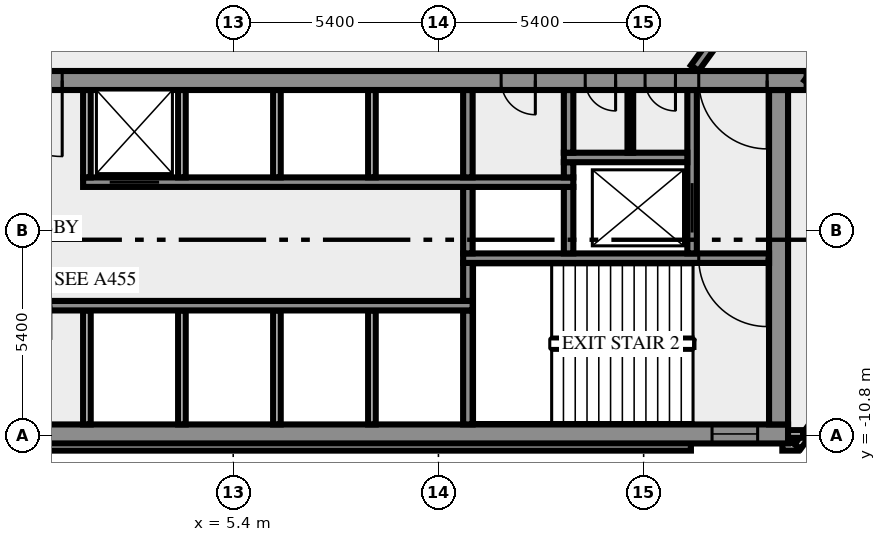
"""IFC4 building model, lengths in metres.
Left out: names, types, materials, properties, quantities, classifications, styles, units other than length and angle.
Written with IfcOpenShell. Run it as: python <this file> out.ifc"""

import sys

from ifc_helpers import new_model, si_unit, direction, frame, frame_2d, origin, place, context, subcontext, project, spatial, rectangle, extrude, element, fill, save


model = new_model("IFC4")
c1 = context("Model", 3, precision=1e-05, world=origin(), true_north=direction((0.0, 1.0)))
c2 = subcontext(c1, "Body", "Model", "MODEL_VIEW")
j1 = project(units=[si_unit("LENGTHUNIT", "METRE"), si_unit("PLANEANGLEUNIT", "RADIAN")], contexts=[c1])
p1 = place(None, origin())
s1 = spatial("IfcSite", under=j1, at=p1, CompositionType="ELEMENT")
p2 = place(p1, origin())
s2 = spatial("IfcBuilding", under=s1, at=p2, CompositionType="ELEMENT")
p3 = place(p2, frame((0.0, 0.0, 47.0)))
s3 = spatial("IfcBuildingStorey", under=s2, at=p3, CompositionType="ELEMENT", Elevation=47.0)
p4 = place(p3, frame((-17.444, -11.088, 0.0), z_axis=(0.0, 0.0, 1.0), x_axis=(1.0, 0.0, 0.0)))
e1 = element("IfcWall", 1, at=p4, inside=s3, PredefinedType="SOLIDWALL", context=c2, shape_type="SweptSolid", body=[
    extrude(rectangle(XDim=34.888, YDim=0.2, at=frame_2d((17.444, 0.0))), origin(), (0.0, 0.0, 1.0), 3.65),
])
p5 = place(p3, frame((19.85, -11.088, 0.0), z_axis=(0.0, 0.0, 1.0), x_axis=(1.0, 0.0, 0.0)))
e2 = element("IfcWall", 2, at=p5, inside=s3, PredefinedType="SOLIDWALL", context=c2, shape_type="SweptSolid", body=[
    extrude(rectangle(XDim=0.406, YDim=0.2, at=frame_2d((0.203, 0.0))), origin(), (0.0, 0.0, 1.0), 3.65),
])
p6 = place(p3, frame((20.253, -11.083, 0.0), z_axis=(0.0, 0.0, 1.0), x_axis=(0.587766567315, 0.809030569476, 0.0)))
e3 = element("IfcWall", 3, at=p6, inside=s3, PredefinedType="SOLIDWALL", context=c2, shape_type="SweptSolid", body=[
    extrude(rectangle(XDim=2.688, YDim=0.2, at=frame_2d((1.344, 0.0))), origin(), (0.0, 0.0, 1.0), 3.65),
])
p7 = place(p3, frame((19.98, -10.75, 0.0), z_axis=(0.0, 0.0, 1.0), x_axis=(1.0, 0.0, 0.0)))
e4 = element("IfcWall", 4, at=p7, inside=s3, PredefinedType="SOLIDWALL", context=c2, shape_type="SweptSolid", body=[
    extrude(rectangle(XDim=0.417, YDim=0.2, at=frame_2d((0.208, 0.0))), origin(), (0.0, 0.0, 1.0), 3.65),
])
p8 = place(p3, frame((-20.0, -10.75, 0.0), z_axis=(0.0, 0.0, 1.0), x_axis=(1.0, 0.0, 0.0)))
e5 = element("IfcWall", 5, at=p8, inside=s3, PredefinedType="SHEAR", context=c2, shape_type="SweptSolid", body=[
    extrude(rectangle(XDim=40.0, YDim=0.5, at=frame_2d((20.0, 0.0))), origin(), (0.0, 0.0, 1.0), 3.65),
])
p9 = place(p8, frame((0.8, 0.0, 1.0)))
e6 = element("IfcOpeningElement", 6, at=p9, cuts=e5, PredefinedType="OPENING", context=c2, shape_type="SweptSolid", body=[
    extrude(rectangle(XDim=1.2, YDim=1.2, at=frame_2d((0.6, 0.6))), frame((0.0, 0.26, 0.0), z_axis=(0.0, -1.0, 0.0), x_axis=(1.0, 0.0, 0.0)), (0.0, 0.0, 1.0), 0.52),
])
p10 = place(p8, frame((38.0, 0.0, 1.0)))
e7 = element("IfcOpeningElement", 7, at=p10, cuts=e5, PredefinedType="OPENING", context=c2, shape_type="SweptSolid", body=[
    extrude(rectangle(XDim=1.2, YDim=1.2, at=frame_2d((0.6, 0.6))), frame((0.0, 0.26, 0.0), z_axis=(0.0, -1.0, 0.0), x_axis=(1.0, 0.0, 0.0)), (0.0, 0.0, 1.0), 0.52),
])
for number, where, z_axis, x_axis in (
    (8, (1.55, -10.5, 0.0), (0.0, 0.0, 1.0), (0.0, 1.0, 0.0)),
    (9, (4.05, -10.5, 0.0), (0.0, 0.0, 1.0), (0.0, 1.0, 0.0)),
    (10, (6.55, -10.5, 0.0), (0.0, 0.0, 1.0), (0.0, 1.0, 0.0)),
    (11, (9.05, -10.5, 0.0), (0.0, 0.0, 1.0), (0.0, 1.0, 0.0)),
):
    element("IfcWall", number, at=place(p3, frame(where, z_axis=z_axis, x_axis=x_axis)), inside=s3, PredefinedType="SOLIDWALL", context=c2, shape_type="SweptSolid", body=[
        extrude(rectangle(XDim=3.0, YDim=0.2, at=frame_2d((1.5, 0.0))), origin(), (0.0, 0.0, 1.0), 3.65),
    ])
p11 = place(p3, frame((11.575, -10.5, 0.0), z_axis=(0.0, 0.0, 1.0), x_axis=(0.0, 1.0, 0.0)))
e12 = element("IfcWall", 12, at=p11, inside=s3, PredefinedType="SHEAR", context=c2, shape_type="SweptSolid", body=[
    extrude(rectangle(XDim=3.0, YDim=0.25, at=frame_2d((1.5, 0.0))), origin(), (0.0, 0.0, 1.0), 3.65),
])
p12 = place(p3, frame((19.75, -10.5, 0.0), z_axis=(0.0, 0.0, 1.0), x_axis=(0.0, 1.0, 0.0)))
e13 = element("IfcWall", 13, at=p12, inside=s3, PredefinedType="SHEAR", context=c2, shape_type="SweptSolid", body=[
    extrude(rectangle(XDim=8.8, YDim=0.5, at=frame_2d((4.4, 0.0))), origin(), (0.0, 0.0, 1.0), 3.65),
])
p13 = place(p3, frame((11.7, -7.375, 0.0), z_axis=(0.0, 0.0, 1.0), x_axis=(-1.0, 0.0, 0.0)))
e14 = element("IfcWall", 14, at=p13, inside=s3, PredefinedType="SHEAR", context=c2, shape_type="SweptSolid", body=[
    extrude(rectangle(XDim=23.4, YDim=0.25, at=frame_2d((11.7, 0.0))), origin(), (0.0, 0.0, 1.0), 3.65),
])
p14 = place(p13, frame((21.45, 0.0, 0.0)))
e15 = element("IfcOpeningElement", 15, at=p14, cuts=e14, PredefinedType="OPENING", context=c2, shape_type="SweptSolid", body=[
    extrude(rectangle(XDim=1.1, YDim=2.1, at=frame_2d((0.55, 1.05))), frame((0.0, 0.135, 0.0), z_axis=(0.0, -1.0, 0.0), x_axis=(1.0, 0.0, 0.0)), (0.0, 0.0, 1.0), 0.27),
])
p15 = place(p13, frame((18.95, 0.0, 0.0)))
e16 = element("IfcOpeningElement", 16, at=p15, cuts=e14, PredefinedType="OPENING", context=c2, shape_type="SweptSolid", body=[
    extrude(rectangle(XDim=1.1, YDim=2.1, at=frame_2d((0.55, 1.05))), frame((0.0, 0.135, 0.0), z_axis=(0.0, -1.0, 0.0), x_axis=(1.0, 0.0, 0.0)), (0.0, 0.0, 1.0), 0.27),
])
p16 = place(p13, frame((16.45, 0.0, 0.0)))
e17 = element("IfcOpeningElement", 17, at=p16, cuts=e14, PredefinedType="OPENING", context=c2, shape_type="SweptSolid", body=[
    extrude(rectangle(XDim=1.1, YDim=2.1, at=frame_2d((0.55, 1.05))), frame((0.0, 0.135, 0.0), z_axis=(0.0, -1.0, 0.0), x_axis=(1.0, 0.0, 0.0)), (0.0, 0.0, 1.0), 0.27),
])
p17 = place(p13, frame((13.875, 0.0, 0.0)))
e18 = element("IfcOpeningElement", 18, at=p17, cuts=e14, PredefinedType="OPENING", context=c2, shape_type="SweptSolid", body=[
    extrude(rectangle(XDim=0.9, YDim=2.1, at=frame_2d((0.45, 1.05))), frame((0.0, 0.135, 0.0), z_axis=(0.0, -1.0, 0.0), x_axis=(1.0, 0.0, 0.0)), (0.0, 0.0, 1.0), 0.27),
])
p18 = place(p13, frame((11.1, 0.0, 0.0)))
e19 = element("IfcOpeningElement", 19, at=p18, cuts=e14, PredefinedType="OPENING", context=c2, shape_type="SweptSolid", body=[
    extrude(rectangle(XDim=0.9, YDim=2.1, at=frame_2d((0.45, 1.05))), frame((0.0, 0.135, 0.0), z_axis=(0.0, -1.0, 0.0), x_axis=(1.0, 0.0, 0.0)), (0.0, 0.0, 1.0), 0.27),
])
p19 = place(p3, frame((11.575, -7.25, 0.0), z_axis=(0.0, 0.0, 1.0), x_axis=(0.0, 1.0, 0.0)))
e20 = element("IfcWall", 20, at=p19, inside=s3, PredefinedType="SHEAR", context=c2, shape_type="SweptSolid", body=[
    extrude(rectangle(XDim=1.0, YDim=0.25, at=frame_2d((0.5, 0.0))), origin(), (0.0, 0.0, 1.0), 3.65),
])
p20 = place(p3, frame((19.5, -6.125, 0.0), z_axis=(0.0, 0.0, 1.0), x_axis=(-1.0, 0.0, 0.0)))
e21 = element("IfcWall", 21, at=p20, inside=s3, PredefinedType="SHEAR", context=c2, shape_type="SweptSolid", body=[
    extrude(rectangle(XDim=8.05, YDim=0.25, at=frame_2d((4.025, 0.0))), origin(), (0.0, 0.0, 1.0), 3.65),
])
p21 = place(p20, frame((0.05, 0.0, 0.0)))
e22 = element("IfcOpeningElement", 22, at=p21, cuts=e21, PredefinedType="OPENING", context=c2, shape_type="SweptSolid", body=[
    extrude(rectangle(XDim=1.8, YDim=2.1, at=frame_2d((0.9, 1.05))), frame((0.0, 0.135, 0.0), z_axis=(0.0, -1.0, 0.0), x_axis=(1.0, 0.0, 0.0)), (0.0, 0.0, 1.0), 0.27),
])
for number, where, z_axis, x_axis in (
    (23, (11.575, -6.0, 0.0), (0.0, 0.0, 1.0), (0.0, 1.0, 0.0)),
    (24, (14.225, -6.0, 0.0), (0.0, 0.0, 1.0), (0.0, 1.0, 0.0)),
):
    element("IfcWall", number, at=place(p3, frame(where, z_axis=z_axis, x_axis=x_axis)), inside=s3, PredefinedType="SHEAR", context=c2, shape_type="SweptSolid", body=[
        extrude(rectangle(XDim=1.75, YDim=0.25, at=frame_2d((0.875, 0.0))), origin(), (0.0, 0.0, 1.0), 3.65),
    ])
p22 = place(p3, frame((17.475, -6.0, 0.0), z_axis=(0.0, 0.0, 1.0), x_axis=(0.0, 1.0, 0.0)))
e25 = element("IfcWall", 25, at=p22, inside=s3, PredefinedType="SHEAR", context=c2, shape_type="SweptSolid", body=[
    extrude(rectangle(XDim=4.3, YDim=0.25, at=frame_2d((2.15, 0.0))), origin(), (0.0, 0.0, 1.0), 3.65),
])
p23 = place(p22, frame((0.55, 0.0, 0.0)))
e26 = element("IfcOpeningElement", 26, at=p23, cuts=e25, PredefinedType="OPENING", context=c2, shape_type="SweptSolid", body=[
    extrude(rectangle(XDim=1.3, YDim=2.1, at=frame_2d((0.65, 1.05))), frame((0.0, 0.135, 0.0), z_axis=(0.0, -1.0, 0.0), x_axis=(1.0, 0.0, 0.0)), (0.0, 0.0, 1.0), 0.27),
])
p24 = place(p3, frame((1.45, -4.125, 0.0), z_axis=(0.0, 0.0, 1.0), x_axis=(1.0, 0.0, 0.0)))
e27 = element("IfcWall", 27, at=p24, inside=s3, PredefinedType="SHEAR", context=c2, shape_type="SweptSolid", body=[
    extrude(rectangle(XDim=12.9, YDim=0.25, at=frame_2d((6.45, 0.0))), origin(), (0.0, 0.0, 1.0), 3.65),
])
p25 = place(p24, frame((0.7, 0.0, 0.0)))
e28 = element("IfcOpeningElement", 28, at=p25, cuts=e27, PredefinedType="OPENING", context=c2, shape_type="SweptSolid", body=[
    extrude(rectangle(XDim=1.3, YDim=2.1, at=frame_2d((0.65, 1.05))), frame((0.0, 0.135, 0.0), z_axis=(0.0, -1.0, 0.0), x_axis=(1.0, 0.0, 0.0)), (0.0, 0.0, 1.0), 0.27),
])
for number, where, z_axis, x_axis in (
    (29, (1.55, -4.0, 0.0), (0.0, 0.0, 1.0), (0.0, 1.0, 0.0)),
    (30, (4.05, -4.0, 0.0), (0.0, 0.0, 1.0), (0.0, 1.0, 0.0)),
    (31, (6.55, -4.0, 0.0), (0.0, 0.0, 1.0), (0.0, 1.0, 0.0)),
    (32, (9.05, -4.0, 0.0), (0.0, 0.0, 1.0), (0.0, 1.0, 0.0)),
):
    element("IfcWall", number, at=place(p3, frame(where, z_axis=z_axis, x_axis=x_axis)), inside=s3, PredefinedType="SOLIDWALL", context=c2, shape_type="SweptSolid", body=[
        extrude(rectangle(XDim=2.3, YDim=0.2, at=frame_2d((1.15, 0.0))), origin(), (0.0, 0.0, 1.0), 3.65),
    ])
p26 = place(p3, frame((11.575, -4.0, 0.0), z_axis=(0.0, 0.0, 1.0), x_axis=(0.0, 1.0, 0.0)))
e33 = element("IfcWall", 33, at=p26, inside=s3, PredefinedType="SHEAR", context=c2, shape_type="SweptSolid", body=[
    extrude(rectangle(XDim=2.3, YDim=0.25, at=frame_2d((1.15, 0.0))), origin(), (0.0, 0.0, 1.0), 3.65),
])
p27 = place(p3, frame((14.225, -4.0, 0.0), z_axis=(0.0, 0.0, 1.0), x_axis=(0.0, 1.0, 0.0)))
e34 = element("IfcWall", 34, at=p27, inside=s3, PredefinedType="SHEAR", context=c2, shape_type="SweptSolid", body=[
    extrude(rectangle(XDim=0.4, YDim=0.25, at=frame_2d((0.2, 0.0))), origin(), (0.0, 0.0, 1.0), 3.65),
])
p28 = place(p3, frame((14.1, -3.475, 0.0), z_axis=(0.0, 0.0, 1.0), x_axis=(1.0, 0.0, 0.0)))
e35 = element("IfcWall", 35, at=p28, inside=s3, PredefinedType="SHEAR", context=c2, shape_type="SweptSolid", body=[
    extrude(rectangle(XDim=3.25, YDim=0.25, at=frame_2d((1.625, 0.0))), origin(), (0.0, 0.0, 1.0), 3.65),
])
p29 = place(p3, frame((14.225, -3.35, 0.0), z_axis=(0.0, 0.0, 1.0), x_axis=(0.0, 1.0, 0.0)))
e36 = element("IfcWall", 36, at=p29, inside=s3, PredefinedType="SHEAR", context=c2, shape_type="SweptSolid", body=[
    extrude(rectangle(XDim=1.65, YDim=0.25, at=frame_2d((0.825, 0.0))), origin(), (0.0, 0.0, 1.0), 3.65),
])
p30 = place(p3, frame((15.85, -3.35, 0.0), z_axis=(0.0, 0.0, 1.0), x_axis=(0.0, 1.0, 0.0)))
e37 = element("IfcWall", 37, at=p30, inside=s3, PredefinedType="PARTITIONING", context=c2, shape_type="SweptSolid", body=[
    extrude(rectangle(XDim=1.65, YDim=0.15, at=frame_2d((0.825, 0.0))), origin(), (0.0, 0.0, 1.0), 3.65),
])
p31 = place(p3, frame((20.49, -1.45, 0.0), z_axis=(0.0, 0.0, 1.0), x_axis=(-1.0, 0.0, 0.0)))
e38 = element("IfcWall", 38, at=p31, inside=s3, PredefinedType="SHEAR", context=c2, shape_type="SweptSolid", body=[
    extrude(rectangle(XDim=40.98, YDim=0.5, at=frame_2d((20.49, 0.0))), origin(), (0.0, 0.0, 1.0), 3.65),
])
p32 = place(p31, frame((38.14, 0.0, 0.0)))
e39 = element("IfcOpeningElement", 39, at=p32, cuts=e38, PredefinedType="OPENING", context=c2, shape_type="SweptSolid", body=[
    extrude(rectangle(XDim=1.8, YDim=2.1, at=frame_2d((0.9, 1.05))), frame((0.0, 0.26, 0.0), z_axis=(0.0, -1.0, 0.0), x_axis=(1.0, 0.0, 0.0)), (0.0, 0.0, 1.0), 0.52),
])
p33 = place(p31, frame((35.89, 0.0, 0.0)))
e40 = element("IfcOpeningElement", 40, at=p33, cuts=e38, PredefinedType="OPENING", context=c2, shape_type="SweptSolid", body=[
    extrude(rectangle(XDim=0.9, YDim=2.1, at=frame_2d((0.45, 1.05))), frame((0.0, 0.26, 0.0), z_axis=(0.0, -1.0, 0.0), x_axis=(1.0, 0.0, 0.0)), (0.0, 0.0, 1.0), 0.52),
])
p34 = place(p31, frame((32.94, 0.0, 0.0)))
e41 = element("IfcOpeningElement", 41, at=p34, cuts=e38, PredefinedType="OPENING", context=c2, shape_type="SweptSolid", body=[
    extrude(rectangle(XDim=0.9, YDim=2.1, at=frame_2d((0.45, 1.05))), frame((0.0, 0.26, 0.0), z_axis=(0.0, -1.0, 0.0), x_axis=(1.0, 0.0, 0.0)), (0.0, 0.0, 1.0), 0.52),
])
p35 = place(p31, frame((19.59, 0.0, 0.0)))
e42 = element("IfcOpeningElement", 42, at=p35, cuts=e38, PredefinedType="OPENING", context=c2, shape_type="SweptSolid", body=[
    extrude(rectangle(XDim=2.0, YDim=2.1, at=frame_2d((1.0, 1.05))), frame((0.0, 0.26, 0.0), z_axis=(0.0, -1.0, 0.0), x_axis=(1.0, 0.0, 0.0)), (0.0, 0.0, 1.0), 0.52),
])
p36 = place(p31, frame((7.14, 0.0, 0.0)))
e43 = element("IfcOpeningElement", 43, at=p36, cuts=e38, PredefinedType="OPENING", context=c2, shape_type="SweptSolid", body=[
    extrude(rectangle(XDim=0.9, YDim=2.1, at=frame_2d((0.45, 1.05))), frame((0.0, 0.26, 0.0), z_axis=(0.0, -1.0, 0.0), x_axis=(1.0, 0.0, 0.0)), (0.0, 0.0, 1.0), 0.52),
])
p37 = place(p31, frame((5.028, 0.0, 0.0)))
e44 = element("IfcOpeningElement", 44, at=p37, cuts=e38, PredefinedType="OPENING", context=c2, shape_type="SweptSolid", body=[
    extrude(rectangle(XDim=0.8, YDim=2.1, at=frame_2d((0.4, 1.05))), frame((0.0, 0.26, 0.0), z_axis=(0.0, -1.0, 0.0), x_axis=(1.0, 0.0, 0.0)), (0.0, 0.0, 1.0), 0.52),
])
p38 = place(p31, frame((3.452, 0.0, 0.0)))
e45 = element("IfcOpeningElement", 45, at=p38, cuts=e38, PredefinedType="OPENING", context=c2, shape_type="SweptSolid", body=[
    extrude(rectangle(XDim=0.8, YDim=2.1, at=frame_2d((0.4, 1.05))), frame((0.0, 0.26, 0.0), z_axis=(0.0, -1.0, 0.0), x_axis=(1.0, 0.0, 0.0)), (0.0, 0.0, 1.0), 0.52),
])
p39 = place(p31, frame((1.04, 0.0, 0.0)))
e46 = element("IfcOpeningElement", 46, at=p39, cuts=e38, PredefinedType="OPENING", context=c2, shape_type="SweptSolid", body=[
    extrude(rectangle(XDim=1.8, YDim=2.1, at=frame_2d((0.9, 1.05))), frame((0.0, 0.26, 0.0), z_axis=(0.0, -1.0, 0.0), x_axis=(1.0, 0.0, 0.0)), (0.0, 0.0, 1.0), 0.52),
])
p40 = place(p3, frame((17.545, -1.125, 0.0), z_axis=(0.0, 0.0, 1.0), x_axis=(0.587786323093, 0.809016216391, 0.0)))
e47 = element("IfcWall", 47, at=p40, inside=s3, PredefinedType="SOLIDWALL", context=c2, shape_type="SweptSolid", body=[
    extrude(rectangle(XDim=33.493, YDim=0.25, at=frame_2d((16.747, 0.0))), origin(), (0.0, 0.0, 1.0), 3.65),
])
p41 = place(p40, frame((16.158, 0.0, 0.0)))
e48 = element("IfcOpeningElement", 48, at=p41, cuts=e47, PredefinedType="OPENING", context=c2, shape_type="SweptSolid", body=[
    extrude(rectangle(XDim=0.9, YDim=2.1, at=frame_2d((0.45, 1.05))), frame((0.0, 0.135, 0.0), z_axis=(0.0, -1.0, 0.0), x_axis=(1.0, 0.0, 0.0)), (0.0, 0.0, 1.0), 0.27),
])
p42 = place(p40, frame((32.253, 0.0, 0.0)))
e49 = element("IfcOpeningElement", 49, at=p42, cuts=e47, PredefinedType="OPENING", context=c2, shape_type="SweptSolid", body=[
    extrude(rectangle(XDim=0.9, YDim=2.1, at=frame_2d((0.45, 1.05))), frame((0.0, 0.135, 0.0), z_axis=(0.0, -1.0, 0.0), x_axis=(1.0, 0.0, 0.0)), (0.0, 0.0, 1.0), 0.27),
])
p43 = place(p40, frame((17.757, 0.0, 0.0)))
e50 = element("IfcOpeningElement", 50, at=p43, cuts=e47, PredefinedType="OPENING", context=c2, shape_type="SweptSolid", body=[
    extrude(rectangle(XDim=1.2, YDim=2.1, at=frame_2d((0.6, 1.05))), frame((0.0, 0.135, 0.0), z_axis=(0.0, -1.0, 0.0), x_axis=(1.0, 0.0, 0.0)), (0.0, 0.0, 1.0), 0.27),
])
p44 = place(p3, frame((46.641, 34.413, 0.0), z_axis=(0.0, 0.0, 1.0), x_axis=(-0.587785682186, -0.809016682039, 0.0)))
e51 = element("IfcWall", 51, at=p44, inside=s3, PredefinedType="SOLIDWALL", context=c2, shape_type="SweptSolid", body=[
    extrude(rectangle(XDim=44.42, YDim=0.25, at=frame_2d((22.21, 0.0))), origin(), (0.0, 0.0, 1.0), 3.65),
])
p45 = place(p44, frame((12.755, 0.0, 0.0)))
e52 = element("IfcOpeningElement", 52, at=p45, cuts=e51, PredefinedType="OPENING", context=c2, shape_type="SweptSolid", body=[
    extrude(rectangle(XDim=0.9, YDim=2.1, at=frame_2d((0.45, 1.05))), frame((0.0, 0.135, 0.0), z_axis=(0.0, -1.0, 0.0), x_axis=(1.0, 0.0, 0.0)), (0.0, 0.0, 1.0), 0.27),
])
p46 = place(p44, frame((29.205, 0.0, 0.0)))
e53 = element("IfcOpeningElement", 53, at=p46, cuts=e51, PredefinedType="OPENING", context=c2, shape_type="SweptSolid", body=[
    extrude(rectangle(XDim=0.9, YDim=2.1, at=frame_2d((0.45, 1.05))), frame((0.0, 0.135, 0.0), z_axis=(0.0, -1.0, 0.0), x_axis=(1.0, 0.0, 0.0)), (0.0, 0.0, 1.0), 0.27),
])
p47 = place(p44, frame((14.354, 0.0, 0.0)))
e54 = element("IfcOpeningElement", 54, at=p47, cuts=e51, PredefinedType="OPENING", context=c2, shape_type="SweptSolid", body=[
    extrude(rectangle(XDim=0.9, YDim=2.1, at=frame_2d((0.45, 1.05))), frame((0.0, 0.135, 0.0), z_axis=(0.0, -1.0, 0.0), x_axis=(1.0, 0.0, 0.0)), (0.0, 0.0, 1.0), 0.27),
])
p48 = place(p44, frame((27.604, 0.0, 0.0)))
e55 = element("IfcOpeningElement", 55, at=p48, cuts=e51, PredefinedType="OPENING", context=c2, shape_type="SweptSolid", body=[
    extrude(rectangle(XDim=0.9, YDim=2.1, at=frame_2d((0.45, 1.05))), frame((0.0, 0.135, 0.0), z_axis=(0.0, -1.0, 0.0), x_axis=(1.0, 0.0, 0.0)), (0.0, 0.0, 1.0), 0.27),
])
p49 = place(p44, frame((0.225, 0.0, 0.0)))
e56 = element("IfcOpeningElement", 56, at=p49, cuts=e51, PredefinedType="OPENING", context=c2, shape_type="SweptSolid", body=[
    extrude(rectangle(XDim=0.9, YDim=2.1, at=frame_2d((0.45, 1.05))), frame((0.0, 0.135, 0.0), z_axis=(0.0, -1.0, 0.0), x_axis=(1.0, 0.0, 0.0)), (0.0, 0.0, 1.0), 0.27),
])
p50 = place(p10, origin())
e57 = element("IfcWindow", 57, at=p50, inside=s3, PartitioningType="SINGLE_PANEL", PredefinedType="WINDOW", context=c2, shape_type="SweptSolid", body=[
    extrude(rectangle(XDim=1.2, YDim=1.2, at=frame_2d((0.6, 0.6))), frame((0.0, 0.03, 0.0), z_axis=(0.0, -1.0, 0.0), x_axis=(1.0, 0.0, 0.0)), (0.0, 0.0, 1.0), 0.06),
])
fill(e7, e57)
p51 = place(p21, origin())
e58 = element("IfcDoor", 58, at=p51, inside=s3, OperationType="DOUBLE_DOOR_SINGLE_SWING", PredefinedType="DOOR", context=c2, shape_type="SweptSolid", body=[
    extrude(rectangle(XDim=1.8, YDim=2.1, at=frame_2d((0.9, 1.05))), frame((0.0, 0.025, 0.0), z_axis=(0.0, -1.0, 0.0), x_axis=(1.0, 0.0, 0.0)), (0.0, 0.0, 1.0), 0.05),
])
fill(e22, e58)
p52 = place(p23, origin())
e59 = element("IfcDoor", 59, at=p52, inside=s3, OperationType="DOUBLE_DOOR_SLIDING", PredefinedType="DOOR", context=c2, shape_type="SweptSolid", body=[
    extrude(rectangle(XDim=1.3, YDim=2.1, at=frame_2d((0.65, 1.05))), frame((0.0, 0.025, 0.0), z_axis=(0.0, -1.0, 0.0), x_axis=(1.0, 0.0, 0.0)), (0.0, 0.0, 1.0), 0.05),
])
fill(e26, e59)
p53 = place(p25, origin())
e60 = element("IfcDoor", 60, at=p53, inside=s3, OperationType="DOUBLE_DOOR_SLIDING", PredefinedType="DOOR", context=c2, shape_type="SweptSolid", body=[
    extrude(rectangle(XDim=1.3, YDim=2.1, at=frame_2d((0.65, 1.05))), frame((0.0, 0.025, 0.0), z_axis=(0.0, -1.0, 0.0), x_axis=(1.0, 0.0, 0.0)), (0.0, 0.0, 1.0), 0.05),
])
fill(e28, e60)
p54 = place(p35, origin())
e61 = element("IfcDoor", 61, at=p54, inside=s3, OperationType="DOUBLE_DOOR_SINGLE_SWING", PredefinedType="DOOR", context=c2, shape_type="SweptSolid", body=[
    extrude(rectangle(XDim=2.0, YDim=2.1, at=frame_2d((1.0, 1.05))), frame((0.0, 0.025, 0.0), z_axis=(0.0, -1.0, 0.0), x_axis=(1.0, 0.0, 0.0)), (0.0, 0.0, 1.0), 0.05),
])
fill(e42, e61)
p55 = place(p36, origin())
e62 = element("IfcDoor", 62, at=p55, inside=s3, OperationType="SINGLE_SWING_LEFT", PredefinedType="DOOR", context=c2, shape_type="SweptSolid", body=[
    extrude(rectangle(XDim=0.9, YDim=2.1, at=frame_2d((0.45, 1.05))), frame((0.0, 0.025, 0.0), z_axis=(0.0, -1.0, 0.0), x_axis=(1.0, 0.0, 0.0)), (0.0, 0.0, 1.0), 0.05),
])
fill(e43, e62)
p56 = place(p37, origin())
e63 = element("IfcDoor", 63, at=p56, inside=s3, OperationType="SINGLE_SWING_LEFT", PredefinedType="DOOR", context=c2, shape_type="SweptSolid", body=[
    extrude(rectangle(XDim=0.8, YDim=2.1, at=frame_2d((0.4, 1.05))), frame((0.0, 0.025, 0.0), z_axis=(0.0, -1.0, 0.0), x_axis=(1.0, 0.0, 0.0)), (0.0, 0.0, 1.0), 0.05),
])
fill(e44, e63)
p57 = place(p38, origin())
e64 = element("IfcDoor", 64, at=p57, inside=s3, OperationType="SINGLE_SWING_LEFT", PredefinedType="DOOR", context=c2, shape_type="SweptSolid", body=[
    extrude(rectangle(XDim=0.8, YDim=2.1, at=frame_2d((0.4, 1.05))), frame((0.0, 0.025, 0.0), z_axis=(0.0, -1.0, 0.0), x_axis=(1.0, 0.0, 0.0)), (0.0, 0.0, 1.0), 0.05),
])
fill(e45, e64)
p58 = place(p39, origin())
e65 = element("IfcDoor", 65, at=p58, inside=s3, OperationType="DOUBLE_DOOR_SINGLE_SWING", PredefinedType="DOOR", context=c2, shape_type="SweptSolid", body=[
    extrude(rectangle(XDim=1.8, YDim=2.1, at=frame_2d((0.9, 1.05))), frame((0.0, 0.025, 0.0), z_axis=(0.0, -1.0, 0.0), x_axis=(1.0, 0.0, 0.0)), (0.0, 0.0, 1.0), 0.05),
])
fill(e46, e65)
save(model, sys.argv[1])
